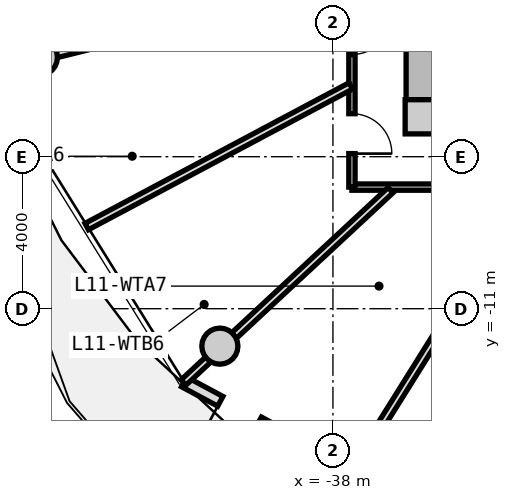
"""IFC4 building model, lengths in metres.
Left out: names, types, materials, properties, quantities, classifications, styles, units other than length and angle.
Written with IfcOpenShell. Run it as: python <this file> out.ifc"""

import sys

from ifc_helpers import new_model, si_unit, direction, frame, frame_2d, origin, origin_2d, place, context, subcontext, project, spatial, rectangle, circle, extrude, source, transform, mapped, element, fill, save


model = new_model("IFC4")
c1 = context("Model", 3, precision=1e-05, world=origin(), true_north=direction((0.0, 1.0)))
c2 = subcontext(c1, "Body", "Model", "MODEL_VIEW")
j1 = project(units=[si_unit("LENGTHUNIT", "METRE"), si_unit("PLANEANGLEUNIT", "RADIAN")], contexts=[c1])
p1 = place(None, origin())
s1 = spatial("IfcSite", under=j1, at=p1, CompositionType="ELEMENT")
p2 = place(p1, origin())
s2 = spatial("IfcBuilding", under=s1, at=p2, CompositionType="ELEMENT")
p3 = place(p2, frame((0.0, 0.0, 39.9)))
s3 = spatial("IfcBuildingStorey", under=s2, at=p3, CompositionType="ELEMENT", Elevation=39.9)
m1 = source(origin(), c2, "Body", "SweptSolid", [
    extrude(rectangle(XDim=0.9, YDim=0.9, at=origin_2d()), origin(), (0.0, 0.0, 1.0), 3.05),
])
p4 = place(p3, frame((-35.65, -5.95, 0.0), z_axis=(0.0, 0.0, 1.0), x_axis=(1.0, 0.0, 0.0)))
e1 = element("IfcColumn", 1, at=p4, inside=s3, PredefinedType="COLUMN", context=c2, shape_type="MappedRepresentation", body=[
    mapped(m1, transform((0.0, 0.0, 0.0), x_axis=(1.0, 0.0, 0.0), y_axis=(0.0, 1.0, 0.0), z_axis=(0.0, 0.0, 1.0), scale=1.0)),
])
m2 = source(origin(), c2, "Body", "SweptSolid", [
    extrude(rectangle(XDim=11.0, YDim=0.85, at=frame_2d((5.5, 0.0))), origin(), (0.0, 0.0, 1.0), 2.79),
])
p5 = place(p3, frame((-35.65, -5.5, 0.0), z_axis=(0.0, 0.0, 1.0), x_axis=(0.0, 1.0, 0.0)))
e2 = element("IfcWall", 2, at=p5, inside=s3, PredefinedType="SHEAR", context=c2, shape_type="MappedRepresentation", body=[
    mapped(m2, transform((0.0, 0.0, 0.0), x_axis=(1.0, 0.0, 0.0), y_axis=(0.0, 1.0, 0.0), z_axis=(0.0, 0.0, 1.0), scale=1.0)),
])
p6 = place(p5, frame((3.8, 0.0, 0.0)))
e3 = element("IfcOpeningElement", 3, at=p6, cuts=e2, PredefinedType="OPENING", context=c2, shape_type="SweptSolid", body=[
    extrude(rectangle(XDim=1.2, YDim=2.15, at=frame_2d((0.6, 1.075))), frame((0.0, 0.435, 0.0), z_axis=(0.0, -1.0, 0.0), x_axis=(1.0, 0.0, 0.0)), (0.0, 0.0, 1.0), 0.87),
])
m3 = source(origin(), c2, "Body", "SweptSolid", [
    extrude(circle(Radius=0.475, at=origin_2d()), origin(), (0.0, 0.0, 1.0), 3.05),
])
for number, where, z_axis, x_axis in (
    (4, (-45.725, -4.387, 0.0), (0.0, 0.0, 1.0), (1.0, 0.0, 0.0)),
    (5, (-40.975, -11.985, 0.0), (0.0, 0.0, 1.0), (1.0, 0.0, 0.0)),
):
    element("IfcColumn", number, at=place(p3, frame(where, z_axis=z_axis, x_axis=x_axis)), inside=s3, PredefinedType="COLUMN", context=c2, shape_type="MappedRepresentation", body=[
        mapped(m3, transform((0.0, 0.0, 0.0), x_axis=(1.0, 0.0, 0.0), y_axis=(0.0, 1.0, 0.0), z_axis=(0.0, 0.0, 1.0), scale=1.0)),
    ])
m4 = source(origin(), c2, "Body", "SweptSolid", [
    extrude(rectangle(XDim=10.011, YDim=0.29, at=frame_2d((5.005, 0.0))), origin(), (0.0, 0.0, 1.0), 2.79),
])
p7 = place(p3, frame((-33.094, -17.657, 0.0), z_axis=(0.0, 0.0, 1.0), x_axis=(-0.881272505317, 0.472608475773, 0.0)))
e6 = element("IfcWall", 6, at=p7, inside=s3, PredefinedType="SOLIDWALL", context=c2, shape_type="MappedRepresentation", body=[
    mapped(m4, transform((0.0, 0.0, 0.0), x_axis=(1.0, 0.0, 0.0), y_axis=(0.0, 1.0, 0.0), z_axis=(0.0, 0.0, 1.0), scale=1.0)),
])
p8 = place(p7, frame((7.78, 0.0, 0.0)))
e7 = element("IfcOpeningElement", 7, at=p8, cuts=e6, PredefinedType="OPENING", context=c2, shape_type="SweptSolid", body=[
    extrude(rectangle(XDim=1.15, YDim=2.25, at=frame_2d((0.575, 1.125))), frame((0.0, 0.155, 0.0), z_axis=(0.0, -1.0, 0.0), x_axis=(1.0, 0.0, 0.0)), (0.0, 0.0, 1.0), 0.31),
])
p9 = place(p7, frame((0.85, 0.0, 0.85)))
e8 = element("IfcOpeningElement", 8, at=p9, cuts=e6, PredefinedType="OPENING", context=c2, shape_type="SweptSolid", body=[
    extrude(rectangle(XDim=1.2, YDim=1.5, at=frame_2d((0.6, 0.75))), frame((0.0, 0.155, 0.0), z_axis=(0.0, -1.0, 0.0), x_axis=(1.0, 0.0, 0.0)), (0.0, 0.0, 1.0), 0.31),
])
m5 = source(origin(), c2, "Body", "SweptSolid", [
    extrude(rectangle(XDim=19.0, YDim=0.165, at=frame_2d((9.5, 0.0))), origin(), (0.0, 0.0, 1.0), 2.775),
])
p10 = place(p3, frame((-18.5, -7.8, 0.0), z_axis=(0.0, 0.0, 1.0), x_axis=(-1.0, 0.0, 0.0)))
e9 = element("IfcWall", 9, at=p10, inside=s3, PredefinedType="PARTITIONING", context=c2, shape_type="MappedRepresentation", body=[
    mapped(m5, transform((0.0, 0.0, 0.0), x_axis=(1.0, 0.0, 0.0), y_axis=(0.0, 1.0, 0.0), z_axis=(0.0, 0.0, 1.0), scale=1.0)),
])
p11 = place(p10, frame((15.652, 0.0, 0.0)))
e10 = element("IfcOpeningElement", 10, at=p11, cuts=e9, PredefinedType="OPENING", context=c2, shape_type="SweptSolid", body=[
    extrude(rectangle(XDim=1.05, YDim=2.15, at=frame_2d((0.525, 1.075))), frame((0.0, 0.093, 0.0), z_axis=(0.0, -1.0, 0.0), x_axis=(1.0, 0.0, 0.0)), (0.0, 0.0, 1.0), 0.185),
])
p12 = place(p10, frame((12.5, 0.0, 0.0)))
e11 = element("IfcOpeningElement", 11, at=p12, cuts=e9, PredefinedType="OPENING", context=c2, shape_type="SweptSolid", body=[
    extrude(rectangle(XDim=1.05, YDim=2.15, at=frame_2d((0.525, 1.075))), frame((0.0, 0.093, 0.0), z_axis=(0.0, -1.0, 0.0), x_axis=(1.0, 0.0, 0.0)), (0.0, 0.0, 1.0), 0.185),
])
p13 = place(p10, frame((10.104, 0.0, 0.0)))
e12 = element("IfcOpeningElement", 12, at=p13, cuts=e9, PredefinedType="OPENING", context=c2, shape_type="SweptSolid", body=[
    extrude(rectangle(XDim=1.05, YDim=2.15, at=frame_2d((0.525, 1.075))), frame((0.0, 0.093, 0.0), z_axis=(0.0, -1.0, 0.0), x_axis=(1.0, 0.0, 0.0)), (0.0, 0.0, 1.0), 0.185),
])
p14 = place(p10, frame((7.806, 0.0, 0.0)))
e13 = element("IfcOpeningElement", 13, at=p14, cuts=e9, PredefinedType="OPENING", context=c2, shape_type="SweptSolid", body=[
    extrude(rectangle(XDim=1.05, YDim=2.15, at=frame_2d((0.525, 1.075))), frame((0.0, 0.093, 0.0), z_axis=(0.0, -1.0, 0.0), x_axis=(1.0, 0.0, 0.0)), (0.0, 0.0, 1.0), 0.185),
])
p15 = place(p10, frame((5.915, 0.0, 0.0)))
e14 = element("IfcOpeningElement", 14, at=p15, cuts=e9, PredefinedType="OPENING", context=c2, shape_type="SweptSolid", body=[
    extrude(rectangle(XDim=0.92, YDim=2.1, at=frame_2d((0.46, 1.05))), frame((0.0, 0.093, 0.0), z_axis=(0.0, -1.0, 0.0), x_axis=(1.0, 0.0, 0.0)), (0.0, 0.0, 1.0), 0.185),
])
p16 = place(p10, frame((2.769, 0.0, 0.0)))
e15 = element("IfcOpeningElement", 15, at=p16, cuts=e9, PredefinedType="OPENING", context=c2, shape_type="SweptSolid", body=[
    extrude(rectangle(XDim=0.92, YDim=2.1, at=frame_2d((0.46, 1.05))), frame((0.0, 0.093, 0.0), z_axis=(0.0, -1.0, 0.0), x_axis=(1.0, 0.0, 0.0)), (0.0, 0.0, 1.0), 0.185),
])
m6 = source(origin(), c2, "Body", "SweptSolid", [
    extrude(rectangle(XDim=15.6, YDim=0.165, at=frame_2d((7.8, 0.0))), origin(), (0.0, 0.0, 1.0), 2.775),
])
p17 = place(p3, frame((-37.5, -7.8, 0.0), z_axis=(0.0, 0.0, 1.0), x_axis=(0.0, 1.0, 0.0)))
e16 = element("IfcWall", 16, at=p17, inside=s3, PredefinedType="PARTITIONING", context=c2, shape_type="MappedRepresentation", body=[
    mapped(m6, transform((0.0, 0.0, 0.0), x_axis=(1.0, 0.0, 0.0), y_axis=(0.0, 1.0, 0.0), z_axis=(0.0, 0.0, 1.0), scale=1.0)),
])
p18 = place(p17, frame((13.293, 0.0, 0.0)))
e17 = element("IfcOpeningElement", 17, at=p18, cuts=e16, PredefinedType="OPENING", context=c2, shape_type="SweptSolid", body=[
    extrude(rectangle(XDim=1.05, YDim=2.15, at=frame_2d((0.525, 1.075))), frame((0.0, 0.093, 0.0), z_axis=(0.0, -1.0, 0.0), x_axis=(1.0, 0.0, 0.0)), (0.0, 0.0, 1.0), 0.185),
])
p19 = place(p17, frame((11.018, 0.0, 0.0)))
e18 = element("IfcOpeningElement", 18, at=p19, cuts=e16, PredefinedType="OPENING", context=c2, shape_type="SweptSolid", body=[
    extrude(rectangle(XDim=1.05, YDim=2.15, at=frame_2d((0.525, 1.075))), frame((0.0, 0.093, 0.0), z_axis=(0.0, -1.0, 0.0), x_axis=(1.0, 0.0, 0.0)), (0.0, 0.0, 1.0), 0.185),
])
p20 = place(p17, frame((7.812, 0.0, 0.0)))
e19 = element("IfcOpeningElement", 19, at=p20, cuts=e16, PredefinedType="OPENING", context=c2, shape_type="SweptSolid", body=[
    extrude(rectangle(XDim=1.05, YDim=2.15, at=frame_2d((0.525, 1.075))), frame((0.0, 0.093, 0.0), z_axis=(0.0, -1.0, 0.0), x_axis=(1.0, 0.0, 0.0)), (0.0, 0.0, 1.0), 0.185),
])
p21 = place(p17, frame((6.035, 0.0, 0.0)))
e20 = element("IfcOpeningElement", 20, at=p21, cuts=e16, PredefinedType="OPENING", context=c2, shape_type="SweptSolid", body=[
    extrude(rectangle(XDim=1.05, YDim=2.15, at=frame_2d((0.525, 1.075))), frame((0.0, 0.093, 0.0), z_axis=(0.0, -1.0, 0.0), x_axis=(1.0, 0.0, 0.0)), (0.0, 0.0, 1.0), 0.185),
])
p22 = place(p17, frame((3.489, 0.0, 0.0)))
e21 = element("IfcOpeningElement", 21, at=p22, cuts=e16, PredefinedType="OPENING", context=c2, shape_type="SweptSolid", body=[
    extrude(rectangle(XDim=1.05, YDim=2.15, at=frame_2d((0.525, 1.075))), frame((0.0, 0.093, 0.0), z_axis=(0.0, -1.0, 0.0), x_axis=(1.0, 0.0, 0.0)), (0.0, 0.0, 1.0), 0.185),
])
p23 = place(p17, frame((0.882, 0.0, 0.0)))
e22 = element("IfcOpeningElement", 22, at=p23, cuts=e16, PredefinedType="OPENING", context=c2, shape_type="SweptSolid", body=[
    extrude(rectangle(XDim=1.05, YDim=2.15, at=frame_2d((0.525, 1.075))), frame((0.0, 0.093, 0.0), z_axis=(0.0, -1.0, 0.0), x_axis=(1.0, 0.0, 0.0)), (0.0, 0.0, 1.0), 0.185),
])
m7 = source(origin(), c2, "Body", "SweptSolid", [
    extrude(rectangle(XDim=9.737, YDim=0.19, at=frame_2d((4.869, 0.0))), origin(), (0.0, 0.0, 1.0), 2.225),
])
p24 = place(p3, frame((-37.58, -2.385, 0.0), z_axis=(0.0, 0.0, 1.0), x_axis=(-0.970392716238, -0.241532557375, 0.0)))
e23 = element("IfcWall", 23, at=p24, inside=s3, PredefinedType="PARTITIONING", context=c2, shape_type="MappedRepresentation", body=[
    mapped(m7, transform((0.0, 0.0, 0.0), x_axis=(1.0, 0.0, 0.0), y_axis=(0.0, 1.0, 0.0), z_axis=(0.0, 0.0, 1.0), scale=1.0)),
])
m8 = source(origin(), c2, "Body", "SweptSolid", [
    extrude(rectangle(XDim=7.435, YDim=0.19, at=frame_2d((3.717, 0.0))), origin(), (0.0, 0.0, 1.0), 2.225),
])
p25 = place(p3, frame((-36.483, -7.88, 0.0), z_axis=(0.0, 0.0, 1.0), x_axis=(-0.732651956848, -0.680603489652, 0.0)))
e24 = element("IfcWall", 24, at=p25, inside=s3, PredefinedType="PARTITIONING", context=c2, shape_type="MappedRepresentation", body=[
    mapped(m8, transform((0.0, 0.0, 0.0), x_axis=(1.0, 0.0, 0.0), y_axis=(0.0, 1.0, 0.0), z_axis=(0.0, 0.0, 1.0), scale=1.0)),
])
m9 = source(origin(), c2, "Body", "SweptSolid", [
    extrude(rectangle(XDim=7.873, YDim=0.19, at=frame_2d((3.937, 0.0))), origin(), (0.0, 0.0, 1.0), 2.775),
])
p26 = place(p3, frame((-37.53, -5.138, 0.0), z_axis=(0.0, 0.0, 1.0), x_axis=(-0.882666052726, -0.470000680175, 0.0)))
e25 = element("IfcWall", 25, at=p26, inside=s3, PredefinedType="PARTITIONING", context=c2, shape_type="MappedRepresentation", body=[
    mapped(m9, transform((0.0, 0.0, 0.0), x_axis=(1.0, 0.0, 0.0), y_axis=(0.0, 1.0, 0.0), z_axis=(0.0, 0.0, 1.0), scale=1.0)),
])
m10 = source(origin(), c2, "Body", "SweptSolid", [
    extrude(rectangle(XDim=8.818, YDim=0.19, at=frame_2d((4.409, 0.0))), origin(), (0.0, 0.0, 1.0), 2.775),
])
p27 = place(p3, frame((-32.841, -7.83, 0.0), z_axis=(0.0, 0.0, 1.0), x_axis=(-0.529931746109, -0.848040296487, 0.0)))
e26 = element("IfcWall", 26, at=p27, inside=s3, PredefinedType="PARTITIONING", context=c2, shape_type="MappedRepresentation", body=[
    mapped(m10, transform((0.0, 0.0, 0.0), x_axis=(1.0, 0.0, 0.0), y_axis=(0.0, 1.0, 0.0), z_axis=(0.0, 0.0, 1.0), scale=1.0)),
])
m11 = source(origin(), c2, "Body", "SweptSolid", [
    extrude(rectangle(XDim=1.15, YDim=2.25, at=frame_2d((0.575, 1.125))), frame((0.0, 0.025, 0.0), z_axis=(0.0, -1.0, 0.0), x_axis=(1.0, 0.0, 0.0)), (0.0, 0.0, 1.0), 0.05),
])
p28 = place(p8, origin())
e27 = element("IfcDoor", 27, at=p28, inside=s3, OperationType="SINGLE_SWING_RIGHT", PredefinedType="DOOR", context=c2, shape_type="MappedRepresentation", body=[
    mapped(m11, transform((0.0, 0.0, 0.0), x_axis=(1.0, 0.0, 0.0), y_axis=(0.0, 1.0, 0.0), z_axis=(0.0, 0.0, 1.0), scale=1.0)),
])
fill(e7, e27)
m12 = source(origin(), c2, "Body", "SweptSolid", [
    extrude(rectangle(XDim=1.05, YDim=2.15, at=frame_2d((0.525, 1.075))), frame((0.0, 0.025, 0.0), z_axis=(0.0, -1.0, 0.0), x_axis=(1.0, 0.0, 0.0)), (0.0, 0.0, 1.0), 0.05),
])
p29 = place(p22, frame((1.05, 0.0, 0.0), z_axis=(0.0, 0.0, 1.0), x_axis=(-1.0, 0.0, 0.0)))
e28 = element("IfcDoor", 28, at=p29, inside=s3, OperationType="SINGLE_SWING_LEFT", PredefinedType="DOOR", context=c2, shape_type="MappedRepresentation", body=[
    mapped(m12, transform((0.0, 0.0, 0.0), x_axis=(1.0, 0.0, 0.0), y_axis=(0.0, 1.0, 0.0), z_axis=(0.0, 0.0, 1.0), scale=1.0)),
])
fill(e21, e28)
p30 = place(p23, frame((1.05, 0.0, 0.0), z_axis=(0.0, 0.0, 1.0), x_axis=(-1.0, 0.0, 0.0)))
e29 = element("IfcDoor", 29, at=p30, inside=s3, OperationType="SINGLE_SWING_RIGHT", PredefinedType="DOOR", context=c2, shape_type="MappedRepresentation", body=[
    mapped(m12, transform((0.0, 0.0, 0.0), x_axis=(1.0, 0.0, 0.0), y_axis=(0.0, 1.0, 0.0), z_axis=(0.0, 0.0, 1.0), scale=1.0)),
])
fill(e22, e29)
save(model, sys.argv[1])
